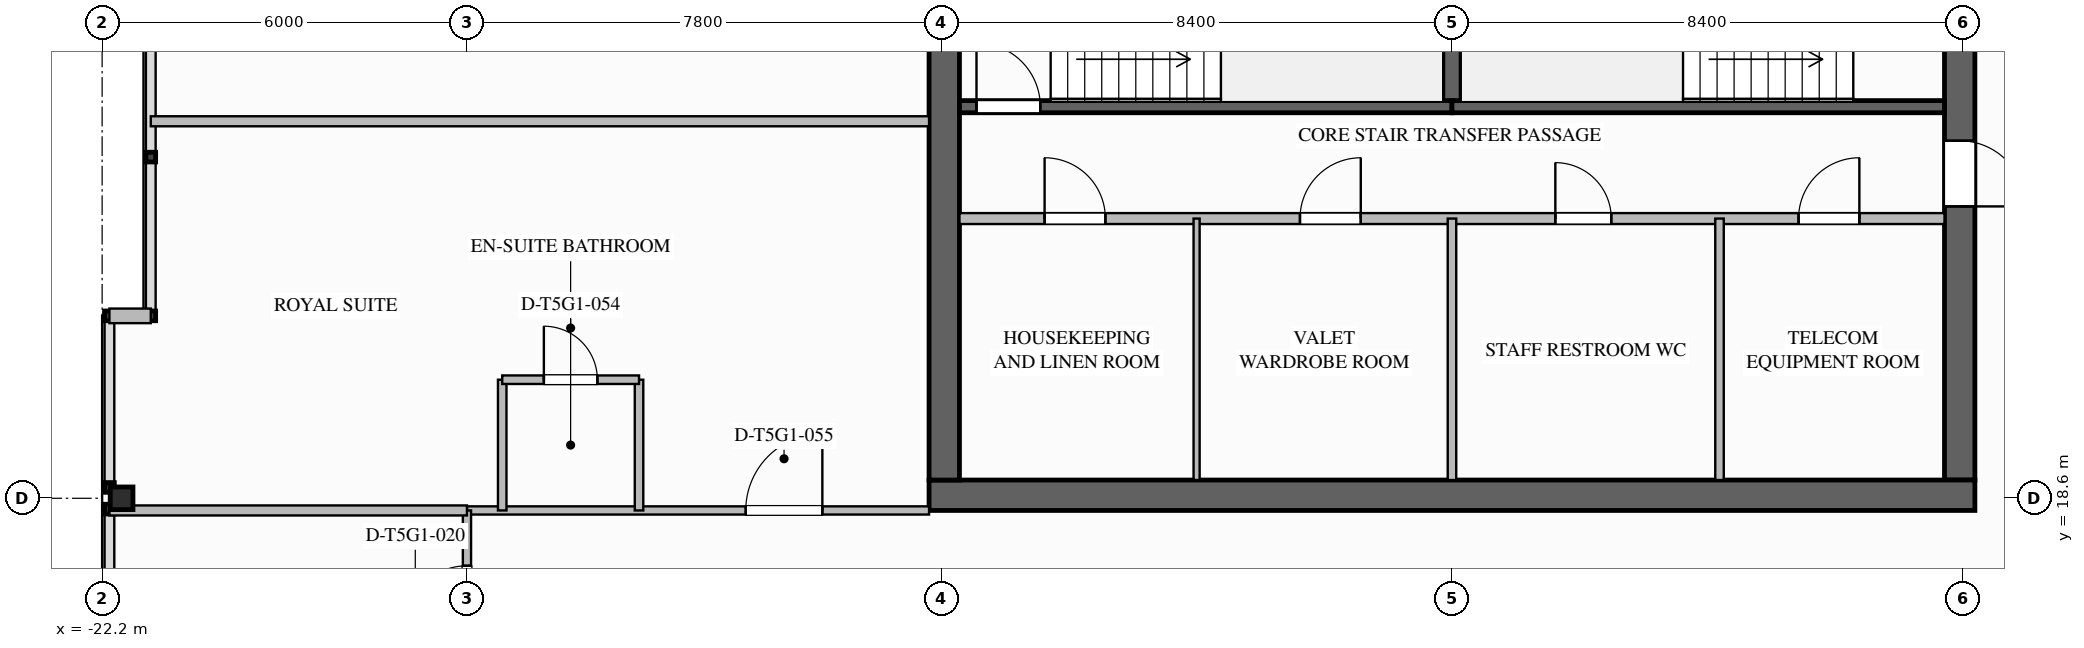
"""IFC4 building model, lengths in metres.
Left out: names, types, materials, properties, quantities, classifications, styles, units other than length and angle.
Written with IfcOpenShell. Run it as: python <this file> out.ifc"""

import sys

from ifc_helpers import new_model, si_unit, direction, frame, frame_2d, origin, origin_2d, place, context, subcontext, project, spatial, rectangle, i_section, extrude, element, fill, save


model = new_model("IFC4")
c1 = context("Model", 3, precision=1e-05, world=origin(), true_north=direction((0.0, 1.0)))
c2 = subcontext(c1, "Body", "Model", "MODEL_VIEW")
j1 = project(units=[si_unit("LENGTHUNIT", "METRE"), si_unit("PLANEANGLEUNIT", "RADIAN")], contexts=[c1])
p1 = place(None, origin())
s1 = spatial("IfcSite", under=j1, at=p1, CompositionType="ELEMENT")
p2 = place(p1, origin())
s2 = spatial("IfcBuilding", under=s1, at=p2, CompositionType="ELEMENT")
p3 = place(p2, frame((0.0, 0.0, 265.0)))
s3 = spatial("IfcBuildingStorey", under=s2, at=p3, CompositionType="ELEMENT", Elevation=265.0)
p4 = place(p3, frame((8.35, 35.1, 0.0), z_axis=(0.0, 0.0, 1.0), x_axis=(0.0, -1.0, 0.0)))
e1 = element("IfcWall", 1, at=p4, inside=s3, PredefinedType="SHEAR", context=c2, shape_type="SweptSolid", body=[
    extrude(rectangle(XDim=16.2, YDim=0.5, at=frame_2d((8.1, 0.0))), origin(), (0.0, 0.0, 1.0), 3.65),
])
p5 = place(p4, frame((3.08, 0.0, 0.0)))
e2 = element("IfcOpeningElement", 2, at=p5, cuts=e1, PredefinedType="OPENING", context=c2, shape_type="SweptSolid", body=[
    extrude(rectangle(XDim=1.12, YDim=2.1, at=frame_2d((0.56, 1.05))), frame((0.0, 0.26, 0.0), z_axis=(0.0, -1.0, 0.0), x_axis=(1.0, 0.0, 0.0)), (0.0, 0.0, 1.0), 0.52),
])
p6 = place(p4, frame((10.62, 0.0, 0.0)))
e3 = element("IfcOpeningElement", 3, at=p6, cuts=e1, PredefinedType="OPENING", context=c2, shape_type="SweptSolid", body=[
    extrude(rectangle(XDim=1.08, YDim=2.04, at=frame_2d((0.54, 1.02))), frame((0.0, 0.26, 0.0), z_axis=(0.0, -1.0, 0.0), x_axis=(1.0, 0.0, 0.0)), (0.0, 0.0, 1.0), 0.52),
])
p7 = place(p3, frame((8.6, 18.65, 0.0), z_axis=(0.0, 0.0, 1.0), x_axis=(-1.0, 0.0, 0.0)))
e4 = element("IfcWall", 4, at=p7, inside=s3, PredefinedType="SHEAR", context=c2, shape_type="SweptSolid", body=[
    extrude(rectangle(XDim=17.2, YDim=0.5, at=frame_2d((8.6, 0.0))), origin(), (0.0, 0.0, 1.0), 3.65),
])
p8 = place(p3, frame((-8.35, 18.9, 0.0), z_axis=(0.0, 0.0, 1.0), x_axis=(0.0, 1.0, 0.0)))
e5 = element("IfcWall", 5, at=p8, inside=s3, PredefinedType="SHEAR", context=c2, shape_type="SweptSolid", body=[
    extrude(rectangle(XDim=16.2, YDim=0.5, at=frame_2d((8.1, 0.0))), origin(), (0.0, 0.0, 1.0), 3.65),
])
p9 = place(p3, frame((-21.88, 18.6, 0.0), z_axis=(0.0, 0.0, 1.0), x_axis=(1.0, 0.0, 0.0)))
e6 = element("IfcColumn", 6, at=p9, inside=s3, PredefinedType="COLUMN", context=c2, shape_type="SweptSolid", body=[
    extrude(i_section(OverallWidth=0.374, OverallDepth=0.372, WebThickness=0.016, FlangeThickness=0.026, FilletRadius=0.025, at=origin_2d()), origin(), (0.0, 0.0, 1.0), 3.647),
])
p10 = place(p3, frame((-22.08, 21.6, 0.0), z_axis=(0.0, 0.0, 1.0), x_axis=(1.0, 0.0, 0.0)))
e7 = element("IfcWall", 7, at=p10, inside=s3, PredefinedType="STANDARD", context=c2, shape_type="SweptSolid", body=[
    extrude(rectangle(XDim=0.68, YDim=0.24, at=frame_2d((0.34, 0.0))), origin(), (0.0, 0.0, 1.0), 3.39),
])
p11 = place(p3, frame((0.0, 25.04, 0.0), z_axis=(0.0, 0.0, 1.0), x_axis=(0.0, 1.0, 0.0)))
e8 = element("IfcWall", 8, at=p11, inside=s3, PredefinedType="SOLIDWALL", context=c2, shape_type="SweptSolid", body=[
    extrude(rectangle(XDim=3.12, YDim=0.3, at=frame_2d((1.56, 0.0))), origin(), (0.0, 0.0, 1.0), 3.39),
])
p12 = place(p3, frame((-8.1, 25.04, 0.0), z_axis=(0.0, 0.0, 1.0), x_axis=(1.0, 0.0, 0.0)))
e9 = element("IfcWall", 9, at=p12, inside=s3, PredefinedType="SOLIDWALL", context=c2, shape_type="SweptSolid", body=[
    extrude(rectangle(XDim=8.1, YDim=0.2, at=frame_2d((4.05, 0.0))), origin(), (0.0, 0.0, 1.0), 3.39),
])
p13 = place(p12, frame((0.28, 0.0, 0.0)))
e10 = element("IfcOpeningElement", 10, at=p13, cuts=e9, PredefinedType="OPENING", context=c2, shape_type="SweptSolid", body=[
    extrude(rectangle(XDim=1.05, YDim=2.1, at=frame_2d((0.525, 1.05))), frame((0.0, 0.11, 0.0), z_axis=(0.0, -1.0, 0.0), x_axis=(1.0, 0.0, 0.0)), (0.0, 0.0, 1.0), 0.22),
])
p14 = place(p3, frame((0.0, 25.04, 0.0), z_axis=(0.0, 0.0, 1.0), x_axis=(1.0, 0.0, 0.0)))
e11 = element("IfcWall", 11, at=p14, inside=s3, PredefinedType="SOLIDWALL", context=c2, shape_type="SweptSolid", body=[
    extrude(rectangle(XDim=8.1, YDim=0.2, at=frame_2d((4.05, 0.0))), origin(), (0.0, 0.0, 1.0), 3.39),
])
p15 = place(p3, frame((-8.1, 23.2, 0.0), z_axis=(0.0, 0.0, 1.0), x_axis=(1.0, 0.0, 0.0)))
e12 = element("IfcWall", 12, at=p15, inside=s3, PredefinedType="SOLIDWALL", context=c2, shape_type="SweptSolid", body=[
    extrude(rectangle(XDim=16.2, YDim=0.18, at=frame_2d((8.1, 0.0))), origin(), (0.0, 0.0, 1.0), 3.39),
])
p16 = place(p15, frame((1.4, 0.0, 0.0)))
e13 = element("IfcOpeningElement", 13, at=p16, cuts=e12, PredefinedType="OPENING", context=c2, shape_type="SweptSolid", body=[
    extrude(rectangle(XDim=1.0, YDim=2.1, at=frame_2d((0.5, 1.05))), frame((0.0, 0.1, 0.0), z_axis=(0.0, -1.0, 0.0), x_axis=(1.0, 0.0, 0.0)), (0.0, 0.0, 1.0), 0.2),
])
p17 = place(p15, frame((5.6, 0.0, 0.0)))
e14 = element("IfcOpeningElement", 14, at=p17, cuts=e12, PredefinedType="OPENING", context=c2, shape_type="SweptSolid", body=[
    extrude(rectangle(XDim=1.0, YDim=2.1, at=frame_2d((0.5, 1.05))), frame((0.0, 0.1, 0.0), z_axis=(0.0, -1.0, 0.0), x_axis=(1.0, 0.0, 0.0)), (0.0, 0.0, 1.0), 0.2),
])
p18 = place(p15, frame((9.8, 0.0, 0.0)))
e15 = element("IfcOpeningElement", 15, at=p18, cuts=e12, PredefinedType="OPENING", context=c2, shape_type="SweptSolid", body=[
    extrude(rectangle(XDim=0.92, YDim=2.1, at=frame_2d((0.46, 1.05))), frame((0.0, 0.1, 0.0), z_axis=(0.0, -1.0, 0.0), x_axis=(1.0, 0.0, 0.0)), (0.0, 0.0, 1.0), 0.2),
])
p19 = place(p15, frame((13.8, 0.0, 0.0)))
e16 = element("IfcOpeningElement", 16, at=p19, cuts=e12, PredefinedType="OPENING", context=c2, shape_type="SweptSolid", body=[
    extrude(rectangle(XDim=1.0, YDim=2.1, at=frame_2d((0.5, 1.05))), frame((0.0, 0.1, 0.0), z_axis=(0.0, -1.0, 0.0), x_axis=(1.0, 0.0, 0.0)), (0.0, 0.0, 1.0), 0.2),
])
p20 = place(p3, frame((-4.2, 18.9, 0.0), z_axis=(0.0, 0.0, 1.0), x_axis=(0.0, 1.0, 0.0)))
e17 = element("IfcWall", 17, at=p20, inside=s3, PredefinedType="PARTITIONING", context=c2, shape_type="SweptSolid", body=[
    extrude(rectangle(XDim=4.3, YDim=0.1, at=frame_2d((2.15, 0.0))), origin(), (0.0, 0.0, 1.0), 3.39),
])
for number, where, z_axis, x_axis in (
    (18, (0.0, 18.9, 0.0), (0.0, 0.0, 1.0), (0.0, 1.0, 0.0)),
    (19, (4.4, 18.9, 0.0), (0.0, 0.0, 1.0), (0.0, 1.0, 0.0)),
):
    element("IfcWall", number, at=place(p3, frame(where, z_axis=z_axis, x_axis=x_axis)), inside=s3, PredefinedType="PLUMBINGWALL", context=c2, shape_type="SweptSolid", body=[
        extrude(rectangle(XDim=4.3, YDim=0.14, at=frame_2d((2.15, 0.0))), origin(), (0.0, 0.0, 1.0), 3.39),
    ])
p21 = place(p3, frame((-16.2, 18.4, 0.0), z_axis=(0.0, 0.0, 1.0), x_axis=(1.0, 0.0, 0.0)))
e20 = element("IfcWall", 20, at=p21, inside=s3, PredefinedType="PARTITIONING", context=c2, shape_type="SweptSolid", body=[
    extrude(rectangle(XDim=7.6, YDim=0.135, at=frame_2d((3.8, 0.0))), origin(), (0.0, 0.0, 1.0), 2.767),
])
p22 = place(p21, frame((4.585, 0.0, 0.0)))
e21 = element("IfcOpeningElement", 21, at=p22, cuts=e20, PredefinedType="OPENING", context=c2, shape_type="SweptSolid", body=[
    extrude(rectangle(XDim=1.26, YDim=2.2, at=frame_2d((0.63, 1.1))), frame((0.0, 0.077, 0.0), z_axis=(0.0, -1.0, 0.0), x_axis=(1.0, 0.0, 0.0)), (0.0, 0.0, 1.0), 0.155),
])
p23 = place(p3, frame((-16.2, 15.95, 0.0), z_axis=(0.0, 0.0, 1.0), x_axis=(0.0, 1.0, 0.0)))
e22 = element("IfcWall", 22, at=p23, inside=s3, PredefinedType="PARTITIONING", context=c2, shape_type="SweptSolid", body=[
    extrude(rectangle(XDim=2.45, YDim=0.135, at=frame_2d((1.225, 0.0))), origin(), (0.0, 0.0, 1.0), 2.764),
])
p24 = place(p23, frame((0.52, 0.0, 0.0)))
e23 = element("IfcOpeningElement", 23, at=p24, cuts=e22, PredefinedType="OPENING", context=c2, shape_type="SweptSolid", body=[
    extrude(rectangle(XDim=1.02, YDim=2.15, at=frame_2d((0.51, 1.075))), frame((0.0, 0.077, 0.0), z_axis=(0.0, -1.0, 0.0), x_axis=(1.0, 0.0, 0.0)), (0.0, 0.0, 1.0), 0.155),
])
p25 = place(p3, frame((-22.08, 18.4, 0.0), z_axis=(0.0, 0.0, 1.0), x_axis=(1.0, 0.0, 0.0)))
e24 = element("IfcWall", 24, at=p25, inside=s3, PredefinedType="PARTITIONING", context=c2, shape_type="SweptSolid", body=[
    extrude(rectangle(XDim=5.88, YDim=0.165, at=frame_2d((2.94, 0.0))), origin(), (0.0, 0.0, 1.0), 2.764),
])
p26 = place(p3, frame((-21.4, 24.8, 0.0), z_axis=(0.0, 0.0, 1.0), x_axis=(1.0, 0.0, 0.0)))
e25 = element("IfcWall", 25, at=p26, inside=s3, PredefinedType="PARTITIONING", context=c2, shape_type="SweptSolid", body=[
    extrude(rectangle(XDim=12.8, YDim=0.165, at=frame_2d((6.4, 0.0))), origin(), (0.0, 0.0, 1.0), 3.39),
])
for number, where, z_axis, x_axis in (
    (26, (-15.62, 18.4, 0.0), (0.0, 0.0, 1.0), (0.0, 1.0, 0.0)),
    (27, (-13.37, 18.4, 0.0), (0.0, 0.0, 1.0), (0.0, 1.0, 0.0)),
):
    element("IfcWall", number, at=place(p3, frame(where, z_axis=z_axis, x_axis=x_axis)), inside=s3, PredefinedType="PLUMBINGWALL", context=c2, shape_type="SweptSolid", body=[
        extrude(rectangle(XDim=2.15, YDim=0.14, at=frame_2d((1.075, 0.0))), origin(), (0.0, 0.0, 1.0), 3.39),
    ])
p27 = place(p3, frame((-15.62, 20.55, 0.0), z_axis=(0.0, 0.0, 1.0), x_axis=(1.0, 0.0, 0.0)))
e28 = element("IfcWall", 28, at=p27, inside=s3, PredefinedType="PLUMBINGWALL", context=c2, shape_type="SweptSolid", body=[
    extrude(rectangle(XDim=2.25, YDim=0.14, at=frame_2d((1.125, 0.0))), origin(), (0.0, 0.0, 1.0), 3.39),
])
p28 = place(p27, frame((0.685, 0.0, 0.0)))
e29 = element("IfcOpeningElement", 29, at=p28, cuts=e28, PredefinedType="OPENING", context=c2, shape_type="SweptSolid", body=[
    extrude(rectangle(XDim=0.88, YDim=2.1, at=frame_2d((0.44, 1.05))), frame((0.0, 0.08, 0.0), z_axis=(0.0, -1.0, 0.0), x_axis=(1.0, 0.0, 0.0)), (0.0, 0.0, 1.0), 0.16),
])
p29 = place(p13, origin())
e30 = element("IfcDoor", 30, at=p29, inside=s3, OperationType="SINGLE_SWING_LEFT", PredefinedType="DOOR", context=c2, shape_type="SweptSolid", body=[
    extrude(rectangle(XDim=1.05, YDim=2.1, at=frame_2d((0.525, 1.05))), frame((0.0, 0.025, 0.0), z_axis=(0.0, -1.0, 0.0), x_axis=(1.0, 0.0, 0.0)), (0.0, 0.0, 1.0), 0.05),
])
fill(e10, e30)
p30 = place(p6, origin())
e31 = element("IfcDoor", 31, at=p30, inside=s3, OperationType="SINGLE_SWING_RIGHT", PredefinedType="DOOR", context=c2, shape_type="SweptSolid", body=[
    extrude(rectangle(XDim=1.08, YDim=2.04, at=frame_2d((0.54, 1.02))), frame((0.0, 0.025, 0.0), z_axis=(0.0, -1.0, 0.0), x_axis=(1.0, 0.0, 0.0)), (0.0, 0.0, 1.0), 0.05),
])
fill(e3, e31)
p31 = place(p16, origin())
e32 = element("IfcDoor", 32, at=p31, inside=s3, OperationType="SINGLE_SWING_LEFT", PredefinedType="DOOR", context=c2, shape_type="SweptSolid", body=[
    extrude(rectangle(XDim=1.0, YDim=2.1, at=frame_2d((0.5, 1.05))), frame((0.0, 0.025, 0.0), z_axis=(0.0, -1.0, 0.0), x_axis=(1.0, 0.0, 0.0)), (0.0, 0.0, 1.0), 0.05),
])
fill(e13, e32)
p32 = place(p17, origin())
e33 = element("IfcDoor", 33, at=p32, inside=s3, OperationType="SINGLE_SWING_RIGHT", PredefinedType="DOOR", context=c2, shape_type="SweptSolid", body=[
    extrude(rectangle(XDim=1.0, YDim=2.1, at=frame_2d((0.5, 1.05))), frame((0.0, 0.025, 0.0), z_axis=(0.0, -1.0, 0.0), x_axis=(1.0, 0.0, 0.0)), (0.0, 0.0, 1.0), 0.05),
])
fill(e14, e33)
p33 = place(p18, origin())
e34 = element("IfcDoor", 34, at=p33, inside=s3, OperationType="SINGLE_SWING_LEFT", PredefinedType="DOOR", context=c2, shape_type="SweptSolid", body=[
    extrude(rectangle(XDim=0.92, YDim=2.1, at=frame_2d((0.46, 1.05))), frame((0.0, 0.025, 0.0), z_axis=(0.0, -1.0, 0.0), x_axis=(1.0, 0.0, 0.0)), (0.0, 0.0, 1.0), 0.05),
])
fill(e15, e34)
p34 = place(p19, origin())
e35 = element("IfcDoor", 35, at=p34, inside=s3, OperationType="SINGLE_SWING_RIGHT", PredefinedType="DOOR", context=c2, shape_type="SweptSolid", body=[
    extrude(rectangle(XDim=1.0, YDim=2.1, at=frame_2d((0.5, 1.05))), frame((0.0, 0.025, 0.0), z_axis=(0.0, -1.0, 0.0), x_axis=(1.0, 0.0, 0.0)), (0.0, 0.0, 1.0), 0.05),
])
fill(e16, e35)
p35 = place(p24, origin())
e36 = element("IfcDoor", 36, at=p35, inside=s3, OperationType="SINGLE_SWING_LEFT", PredefinedType="DOOR", context=c2, shape_type="SweptSolid", body=[
    extrude(rectangle(XDim=1.02, YDim=2.15, at=frame_2d((0.51, 1.075))), frame((0.0, 0.025, 0.0), z_axis=(0.0, -1.0, 0.0), x_axis=(1.0, 0.0, 0.0)), (0.0, 0.0, 1.0), 0.05),
])
fill(e23, e36)
p36 = place(p28, origin())
e37 = element("IfcDoor", 37, at=p36, inside=s3, OperationType="SINGLE_SWING_LEFT", PredefinedType="DOOR", context=c2, shape_type="SweptSolid", body=[
    extrude(rectangle(XDim=0.88, YDim=2.1, at=frame_2d((0.44, 1.05))), frame((0.0, 0.025, 0.0), z_axis=(0.0, -1.0, 0.0), x_axis=(1.0, 0.0, 0.0)), (0.0, 0.0, 1.0), 0.05),
])
fill(e29, e37)
p37 = place(p22, origin())
e38 = element("IfcDoor", 38, at=p37, inside=s3, OperationType="SINGLE_SWING_RIGHT", PredefinedType="DOOR", context=c2, shape_type="SweptSolid", body=[
    extrude(rectangle(XDim=1.26, YDim=2.2, at=frame_2d((0.63, 1.1))), frame((0.0, 0.025, 0.0), z_axis=(0.0, -1.0, 0.0), x_axis=(1.0, 0.0, 0.0)), (0.0, 0.0, 1.0), 0.05),
])
fill(e21, e38)
save(model, sys.argv[1])
